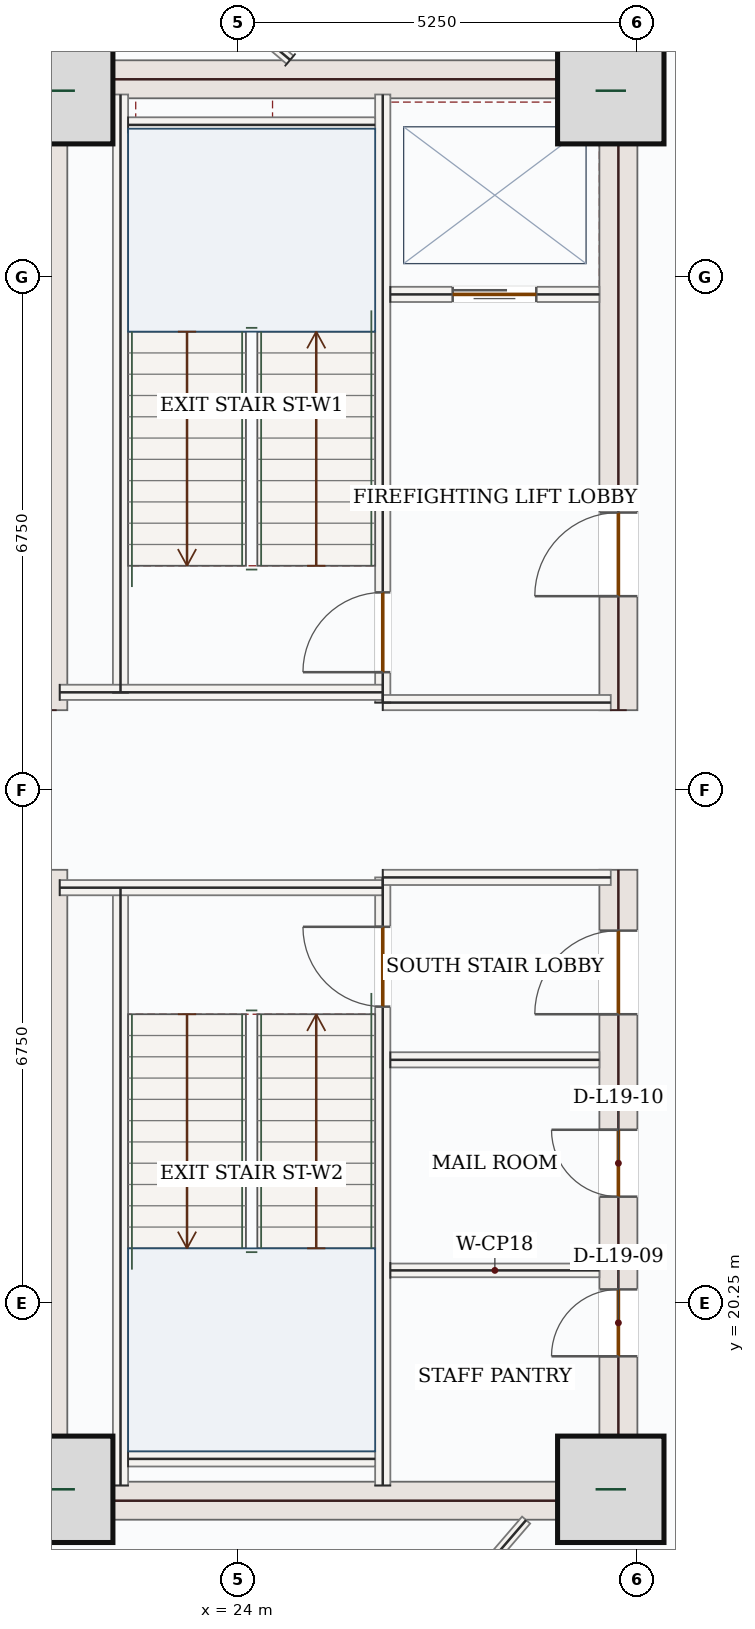
"""IFC4 building model, lengths in metres.
Left out: names, types, materials, properties, quantities, classifications, styles, units other than length and angle.
Written with IfcOpenShell. Run it as: python <this file> out.ifc"""

import sys

from ifc_helpers import new_model, si_unit, direction, frame, frame_2d, origin, origin_2d, place, context, subcontext, project, spatial, rectangle, extrude, source, transform, mapped, element, fill, save


model = new_model("IFC4")
c1 = context("Model", 3, precision=1e-05, world=origin(), true_north=direction((0.0, 1.0)))
c2 = subcontext(c1, "Body", "Model", "MODEL_VIEW")
j1 = project(units=[si_unit("LENGTHUNIT", "METRE"), si_unit("PLANEANGLEUNIT", "RADIAN")], contexts=[c1])
p1 = place(None, origin())
s1 = spatial("IfcSite", under=j1, at=p1, CompositionType="ELEMENT")
p2 = place(p1, origin())
s2 = spatial("IfcBuilding", under=s1, at=p2, CompositionType="ELEMENT")
p3 = place(p2, frame((0.0, 0.0, 87.9)))
s3 = spatial("IfcBuildingStorey", under=s2, at=p3, CompositionType="ELEMENT", Elevation=87.9)
m1 = source(origin(), c2, "Body", "SweptSolid", [
    extrude(rectangle(XDim=8.55, YDim=0.5, at=frame_2d((4.275, 0.0))), origin(), (0.0, 0.0, 1.0), 3.95),
])
for number, where, z_axis, x_axis in (
    (1, (21.5, 17.4, 0.0), (0.0, 0.0, 1.0), (0.0, 1.0, 0.0)),
    (2, (21.5, 28.05, 0.0), (0.0, 0.0, 1.0), (0.0, 1.0, 0.0)),
):
    element("IfcWall", number, at=place(p3, frame(where, z_axis=z_axis, x_axis=x_axis)), inside=s3, PredefinedType="SHEAR", context=c2, shape_type="MappedRepresentation", body=[
        mapped(m1, transform((0.0, 0.0, 0.0), x_axis=(1.0, 0.0, 0.0), y_axis=(0.0, 1.0, 0.0), z_axis=(0.0, 0.0, 1.0), scale=1.0)),
    ])
p4 = place(p3, frame((29.0, 17.4, 0.0), z_axis=(0.0, 0.0, 1.0), x_axis=(0.0, 1.0, 0.0)))
e3 = element("IfcWall", 3, at=p4, inside=s3, PredefinedType="SHEAR", context=c2, shape_type="SweptSolid", body=[
    extrude(rectangle(XDim=8.55, YDim=0.5, at=frame_2d((4.275, 0.0))), origin(), (0.0, 0.0, 1.0), 3.95),
])
p5 = place(p4, frame((6.65, 0.0, 0.0)))
e4 = element("IfcOpeningElement", 4, at=p5, cuts=e3, PredefinedType="OPENING", context=c2, shape_type="SweptSolid", body=[
    extrude(rectangle(XDim=1.1, YDim=2.2, at=frame_2d((0.55, 1.1))), frame((0.0, 0.26, 0.0), z_axis=(0.0, -1.0, 0.0), x_axis=(1.0, 0.0, 0.0)), (0.0, 0.0, 1.0), 0.52),
])
p6 = place(p4, frame((2.15, 0.0, 0.0)))
e5 = element("IfcOpeningElement", 5, at=p6, cuts=e3, PredefinedType="OPENING", context=c2, shape_type="SweptSolid", body=[
    extrude(rectangle(XDim=0.88, YDim=2.1, at=frame_2d((0.44, 1.05))), frame((0.0, 0.26, 0.0), z_axis=(0.0, -1.0, 0.0), x_axis=(1.0, 0.0, 0.0)), (0.0, 0.0, 1.0), 0.52),
])
p7 = place(p4, frame((4.25, 0.0, 0.0)))
e6 = element("IfcOpeningElement", 6, at=p7, cuts=e3, PredefinedType="OPENING", context=c2, shape_type="SweptSolid", body=[
    extrude(rectangle(XDim=0.88, YDim=2.1, at=frame_2d((0.44, 1.05))), frame((0.0, 0.26, 0.0), z_axis=(0.0, -1.0, 0.0), x_axis=(1.0, 0.0, 0.0)), (0.0, 0.0, 1.0), 0.52),
])
p8 = place(p3, frame((29.0, 28.05, 0.0), z_axis=(0.0, 0.0, 1.0), x_axis=(0.0, 1.0, 0.0)))
e7 = element("IfcWall", 7, at=p8, inside=s3, PredefinedType="SHEAR", context=c2, shape_type="SweptSolid", body=[
    extrude(rectangle(XDim=8.55, YDim=0.5, at=frame_2d((4.275, 0.0))), origin(), (0.0, 0.0, 1.0), 3.95),
])
p9 = place(p8, frame((1.5, 0.0, 0.0)))
e8 = element("IfcOpeningElement", 8, at=p9, cuts=e7, PredefinedType="OPENING", context=c2, shape_type="SweptSolid", body=[
    extrude(rectangle(XDim=1.1, YDim=2.2, at=frame_2d((0.55, 1.1))), frame((0.0, 0.26, 0.0), z_axis=(0.0, -1.0, 0.0), x_axis=(1.0, 0.0, 0.0)), (0.0, 0.0, 1.0), 0.52),
])
m2 = source(origin(), c2, "Body", "SweptSolid", [
    extrude(rectangle(XDim=7.0, YDim=0.5, at=frame_2d((3.5, 0.0))), origin(), (0.0, 0.0, 1.0), 3.95),
])
for number, where, z_axis, x_axis in (
    (9, (21.75, 17.65, 0.0), (0.0, 0.0, 1.0), (1.0, 0.0, 0.0)),
    (10, (21.75, 36.35, 0.0), (0.0, 0.0, 1.0), (1.0, 0.0, 0.0)),
):
    element("IfcWall", number, at=place(p3, frame(where, z_axis=z_axis, x_axis=x_axis)), inside=s3, PredefinedType="SHEAR", context=c2, shape_type="MappedRepresentation", body=[
        mapped(m2, transform((0.0, 0.0, 0.0), x_axis=(1.0, 0.0, 0.0), y_axis=(0.0, 1.0, 0.0), z_axis=(0.0, 0.0, 1.0), scale=1.0)),
    ])
m3 = source(origin(), c2, "Body", "SweptSolid", [
    extrude(rectangle(XDim=1.4, YDim=1.4, at=origin_2d()), origin(), (0.0, 0.0, 1.0), 4.2),
])
for number, where, z_axis, x_axis in (
    (11, (21.65, 17.8, 0.0), (0.0, 0.0, 1.0), (1.0, 0.0, 0.0)),
    (12, (28.9, 17.8, 0.0), (0.0, 0.0, 1.0), (1.0, 0.0, 0.0)),
    (13, (21.65, 36.2, 0.0), (0.0, 0.0, 1.0), (1.0, 0.0, 0.0)),
    (14, (28.9, 36.2, 0.0), (0.0, 0.0, 1.0), (1.0, 0.0, 0.0)),
):
    element("IfcColumn", number, at=place(p3, frame(where, z_axis=z_axis, x_axis=x_axis)), inside=s3, PredefinedType="COLUMN", context=c2, shape_type="MappedRepresentation", body=[
        mapped(m3, transform((0.0, 0.0, 0.0), x_axis=(1.0, 0.0, 0.0), y_axis=(0.0, 1.0, 0.0), z_axis=(0.0, 0.0, 1.0), scale=1.0)),
    ])
p10 = place(p3, frame((22.658, 14.74, 0.0), z_axis=(0.0, 0.0, 1.0), x_axis=(-0.707106781187, 0.707106781187, 0.0)))
e15 = element("IfcWall", 15, at=p10, inside=s3, PredefinedType="SOLIDWALL", context=c2, shape_type="SweptSolid", body=[
    extrude(rectangle(XDim=5.258, YDim=0.32, at=frame_2d((2.629, 0.0))), origin(), (0.0, 0.0, 1.0), 3.95),
])
p11 = place(p10, frame((1.429, 0.0, 0.85)))
e16 = element("IfcOpeningElement", 16, at=p11, cuts=e15, PredefinedType="OPENING", context=c2, shape_type="SweptSolid", body=[
    extrude(rectangle(XDim=2.4, YDim=1.8, at=frame_2d((1.2, 0.9))), frame((0.0, 0.17, 0.0), z_axis=(0.0, -1.0, 0.0), x_axis=(1.0, 0.0, 0.0)), (0.0, 0.0, 1.0), 0.34),
])
m4 = source(origin(), c2, "Body", "SweptSolid", [
    extrude(rectangle(XDim=5.258, YDim=0.32, at=frame_2d((2.629, 0.0))), origin(), (0.0, 0.0, 1.0), 3.95),
])
p12 = place(p3, frame((18.94, 35.542, 0.0), z_axis=(0.0, 0.0, 1.0), x_axis=(0.707106781187, 0.707106781187, 0.0)))
e17 = element("IfcWall", 17, at=p12, inside=s3, PredefinedType="SOLIDWALL", context=c2, shape_type="MappedRepresentation", body=[
    mapped(m4, transform((0.0, 0.0, 0.0), x_axis=(1.0, 0.0, 0.0), y_axis=(0.0, 1.0, 0.0), z_axis=(0.0, 0.0, 1.0), scale=1.0)),
])
m5 = source(origin(), c2, "Body", "SweptSolid", [
    extrude(rectangle(XDim=7.87, YDim=0.2, at=frame_2d((3.935, 0.0))), origin(), (0.0, 0.0, 1.0), 3.95),
])
for number, where, z_axis, x_axis in (
    (18, (22.45, 17.85, 0.0), (0.0, 0.0, 1.0), (0.0, 1.0, 0.0)),
    (19, (22.45, 28.28, 0.0), (0.0, 0.0, 1.0), (0.0, 1.0, 0.0)),
):
    element("IfcWall", number, at=place(p3, frame(where, z_axis=z_axis, x_axis=x_axis)), inside=s3, PredefinedType="SOLIDWALL", context=c2, shape_type="MappedRepresentation", body=[
        mapped(m5, transform((0.0, 0.0, 0.0), x_axis=(1.0, 0.0, 0.0), y_axis=(0.0, 1.0, 0.0), z_axis=(0.0, 0.0, 1.0), scale=1.0)),
    ])
p13 = place(p3, frame((25.9, 17.85, 0.0), z_axis=(0.0, 0.0, 1.0), x_axis=(0.0, 1.0, 0.0)))
e20 = element("IfcWall", 20, at=p13, inside=s3, PredefinedType="SOLIDWALL", context=c2, shape_type="SweptSolid", body=[
    extrude(rectangle(XDim=8.0, YDim=0.2, at=frame_2d((4.0, 0.0))), origin(), (0.0, 0.0, 1.0), 3.95),
])
p14 = place(p13, frame((6.3, 0.0, 0.0)))
e21 = element("IfcOpeningElement", 21, at=p14, cuts=e20, PredefinedType="OPENING", context=c2, shape_type="SweptSolid", body=[
    extrude(rectangle(XDim=1.05, YDim=2.15, at=frame_2d((0.525, 1.075))), frame((0.0, 0.11, 0.0), z_axis=(0.0, -1.0, 0.0), x_axis=(1.0, 0.0, 0.0)), (0.0, 0.0, 1.0), 0.22),
])
p15 = place(p3, frame((25.9, 28.15, 0.0), z_axis=(0.0, 0.0, 1.0), x_axis=(0.0, 1.0, 0.0)))
e22 = element("IfcWall", 22, at=p15, inside=s3, PredefinedType="SOLIDWALL", context=c2, shape_type="SweptSolid", body=[
    extrude(rectangle(XDim=8.0, YDim=0.2, at=frame_2d((4.0, 0.0))), origin(), (0.0, 0.0, 1.0), 3.95),
])
p16 = place(p15, frame((0.4, 0.0, 0.0)))
e23 = element("IfcOpeningElement", 23, at=p16, cuts=e22, PredefinedType="OPENING", context=c2, shape_type="SweptSolid", body=[
    extrude(rectangle(XDim=1.05, YDim=2.15, at=frame_2d((0.525, 1.075))), frame((0.0, 0.11, 0.0), z_axis=(0.0, -1.0, 0.0), x_axis=(1.0, 0.0, 0.0)), (0.0, 0.0, 1.0), 0.22),
])
m6 = source(origin(), c2, "Body", "SweptSolid", [
    extrude(rectangle(XDim=4.25, YDim=0.2, at=frame_2d((2.125, 0.0))), origin(), (0.0, 0.0, 1.0), 3.95),
])
p17 = place(p3, frame((21.65, 25.715, 0.0), z_axis=(0.0, 0.0, 1.0), x_axis=(1.0, 0.0, 0.0)))
e24 = element("IfcWall", 24, at=p17, inside=s3, PredefinedType="SOLIDWALL", context=c2, shape_type="MappedRepresentation", body=[
    mapped(m6, transform((0.0, 0.0, 0.0), x_axis=(1.0, 0.0, 0.0), y_axis=(0.0, 1.0, 0.0), z_axis=(0.0, 0.0, 1.0), scale=1.0)),
])
m7 = source(origin(), c2, "Body", "SweptSolid", [
    extrude(rectangle(XDim=3.0, YDim=0.2, at=frame_2d((1.5, 0.0))), origin(), (0.0, 0.0, 1.0), 3.95),
])
p18 = place(p3, frame((25.9, 25.85, 0.0), z_axis=(0.0, 0.0, 1.0), x_axis=(1.0, 0.0, 0.0)))
e25 = element("IfcWall", 25, at=p18, inside=s3, PredefinedType="SOLIDWALL", context=c2, shape_type="MappedRepresentation", body=[
    mapped(m7, transform((0.0, 0.0, 0.0), x_axis=(1.0, 0.0, 0.0), y_axis=(0.0, 1.0, 0.0), z_axis=(0.0, 0.0, 1.0), scale=1.0)),
])
p19 = place(p3, frame((21.65, 28.285, 0.0), z_axis=(0.0, 0.0, 1.0), x_axis=(1.0, 0.0, 0.0)))
e26 = element("IfcWall", 26, at=p19, inside=s3, PredefinedType="SOLIDWALL", context=c2, shape_type="MappedRepresentation", body=[
    mapped(m6, transform((0.0, 0.0, 0.0), x_axis=(1.0, 0.0, 0.0), y_axis=(0.0, 1.0, 0.0), z_axis=(0.0, 0.0, 1.0), scale=1.0)),
])
p20 = place(p3, frame((25.9, 28.15, 0.0), z_axis=(0.0, 0.0, 1.0), x_axis=(1.0, 0.0, 0.0)))
e27 = element("IfcWall", 27, at=p20, inside=s3, PredefinedType="SOLIDWALL", context=c2, shape_type="MappedRepresentation", body=[
    mapped(m7, transform((0.0, 0.0, 0.0), x_axis=(1.0, 0.0, 0.0), y_axis=(0.0, 1.0, 0.0), z_axis=(0.0, 0.0, 1.0), scale=1.0)),
])
m8 = source(origin(), c2, "Body", "SweptSolid", [
    extrude(rectangle(XDim=3.25, YDim=0.2, at=frame_2d((1.625, 0.0))), origin(), (0.0, 0.0, 1.0), 3.95),
])
for number, where, z_axis, x_axis in (
    (28, (22.55, 35.75, 0.0), (0.0, 0.0, 1.0), (1.0, 0.0, 0.0)),
    (29, (22.55, 18.2, 0.0), (0.0, 0.0, 1.0), (1.0, 0.0, 0.0)),
):
    element("IfcWall", number, at=place(p3, frame(where, z_axis=z_axis, x_axis=x_axis)), inside=s3, PredefinedType="SOLIDWALL", context=c2, shape_type="MappedRepresentation", body=[
        mapped(m8, transform((0.0, 0.0, 0.0), x_axis=(1.0, 0.0, 0.0), y_axis=(0.0, 1.0, 0.0), z_axis=(0.0, 0.0, 1.0), scale=1.0)),
    ])
p21 = place(p3, frame((26.0, 33.52, 0.0), z_axis=(0.0, 0.0, 1.0), x_axis=(1.0, 0.0, 0.0)))
e30 = element("IfcWall", 30, at=p21, inside=s3, PredefinedType="SOLIDWALL", context=c2, shape_type="SweptSolid", body=[
    extrude(rectangle(XDim=2.75, YDim=0.2, at=frame_2d((1.375, 0.0))), origin(), (0.0, 0.0, 1.0), 3.95),
])
p22 = place(p21, frame((0.82, 0.0, 0.0)))
e31 = element("IfcOpeningElement", 31, at=p22, cuts=e30, PredefinedType="OPENING", context=c2, shape_type="SweptSolid", body=[
    extrude(rectangle(XDim=1.1, YDim=2.15, at=frame_2d((0.55, 1.075))), frame((0.0, 0.11, 0.0), z_axis=(0.0, -1.0, 0.0), x_axis=(1.0, 0.0, 0.0)), (0.0, 0.0, 1.0), 0.22),
])
m9 = source(origin(), c2, "Body", "SweptSolid", [
    extrude(rectangle(XDim=2.75, YDim=0.2, at=frame_2d((1.375, 0.0))), origin(), (0.0, 0.0, 1.0), 3.95),
])
p23 = place(p3, frame((26.0, 23.45, 0.0), z_axis=(0.0, 0.0, 1.0), x_axis=(1.0, 0.0, 0.0)))
e32 = element("IfcWall", 32, at=p23, inside=s3, PredefinedType="SOLIDWALL", context=c2, shape_type="MappedRepresentation", body=[
    mapped(m9, transform((0.0, 0.0, 0.0), x_axis=(1.0, 0.0, 0.0), y_axis=(0.0, 1.0, 0.0), z_axis=(0.0, 0.0, 1.0), scale=1.0)),
])
m10 = source(origin(), c2, "Body", "SweptSolid", [
    extrude(rectangle(XDim=2.75, YDim=0.18, at=frame_2d((1.375, 0.0))), origin(), (0.0, 0.0, 1.0), 3.95),
])
p24 = place(p3, frame((26.0, 20.68, 0.0), z_axis=(0.0, 0.0, 1.0), x_axis=(1.0, 0.0, 0.0)))
e33 = element("IfcWall", 33, at=p24, inside=s3, PredefinedType="PARTITIONING", context=c2, shape_type="MappedRepresentation", body=[
    mapped(m10, transform((0.0, 0.0, 0.0), x_axis=(1.0, 0.0, 0.0), y_axis=(0.0, 1.0, 0.0), z_axis=(0.0, 0.0, 1.0), scale=1.0)),
])
m11 = source(origin(), c2, "Body", "SweptSolid", [
    extrude(rectangle(XDim=3.155, YDim=0.14, at=frame_2d((1.577, 0.0))), origin(), (0.0, 0.0, 1.0), 3.95),
])
p25 = place(p3, frame((24.682, 36.605, 0.0), z_axis=(0.0, 0.0, 1.0), x_axis=(-0.76411384058, 0.645081420159, 0.0)))
e34 = element("IfcWall", 34, at=p25, inside=s3, PredefinedType="PARTITIONING", context=c2, shape_type="MappedRepresentation", body=[
    mapped(m11, transform((0.0, 0.0, 0.0), x_axis=(1.0, 0.0, 0.0), y_axis=(0.0, 1.0, 0.0), z_axis=(0.0, 0.0, 1.0), scale=1.0)),
])
m12 = source(origin(), c2, "Body", "SweptSolid", [
    extrude(rectangle(XDim=3.29, YDim=0.14, at=frame_2d((1.645, 0.0))), origin(), (0.0, 0.0, 1.0), 3.95),
])
p26 = place(p3, frame((25.64, 14.901, 0.0), z_axis=(0.0, 0.0, 1.0), x_axis=(0.652214149627, 0.758034763732, 0.0)))
e35 = element("IfcWall", 35, at=p26, inside=s3, PredefinedType="PARTITIONING", context=c2, shape_type="MappedRepresentation", body=[
    mapped(m12, transform((0.0, 0.0, 0.0), x_axis=(1.0, 0.0, 0.0), y_axis=(0.0, 1.0, 0.0), z_axis=(0.0, 0.0, 1.0), scale=1.0)),
])
m13 = source(origin(), c2, "Body", "SweptSolid", [
    extrude(rectangle(XDim=2.4, YDim=1.8, at=frame_2d((1.2, 0.9))), frame((0.0, 0.03, 0.0), z_axis=(0.0, -1.0, 0.0), x_axis=(1.0, 0.0, 0.0)), (0.0, 0.0, 1.0), 0.06),
])
p27 = place(p11, origin())
e36 = element("IfcWindow", 36, at=p27, inside=s3, PartitioningType="DOUBLE_PANEL_VERTICAL", PredefinedType="WINDOW", context=c2, shape_type="MappedRepresentation", body=[
    mapped(m13, transform((0.0, 0.0, 0.0), x_axis=(1.0, 0.0, 0.0), y_axis=(0.0, 1.0, 0.0), z_axis=(0.0, 0.0, 1.0), scale=1.0)),
])
fill(e16, e36)
m14 = source(origin(), c2, "Body", "SweptSolid", [
    extrude(rectangle(XDim=1.05, YDim=2.15, at=frame_2d((0.525, 1.075))), frame((0.0, 0.025, 0.0), z_axis=(0.0, -1.0, 0.0), x_axis=(1.0, 0.0, 0.0)), (0.0, 0.0, 1.0), 0.05),
])
p28 = place(p16, origin())
e37 = element("IfcDoor", 37, at=p28, inside=s3, OperationType="SINGLE_SWING_LEFT", PredefinedType="DOOR", context=c2, shape_type="MappedRepresentation", body=[
    mapped(m14, transform((0.0, 0.0, 0.0), x_axis=(1.0, 0.0, 0.0), y_axis=(0.0, 1.0, 0.0), z_axis=(0.0, 0.0, 1.0), scale=1.0)),
])
fill(e23, e37)
p29 = place(p14, origin())
e38 = element("IfcDoor", 38, at=p29, inside=s3, OperationType="SINGLE_SWING_RIGHT", PredefinedType="DOOR", context=c2, shape_type="MappedRepresentation", body=[
    mapped(m14, transform((0.0, 0.0, 0.0), x_axis=(1.0, 0.0, 0.0), y_axis=(0.0, 1.0, 0.0), z_axis=(0.0, 0.0, 1.0), scale=1.0)),
])
fill(e21, e38)
m15 = source(origin(), c2, "Body", "SweptSolid", [
    extrude(rectangle(XDim=1.1, YDim=2.15, at=frame_2d((0.55, 1.075))), frame((0.0, 0.025, 0.0), z_axis=(0.0, -1.0, 0.0), x_axis=(1.0, 0.0, 0.0)), (0.0, 0.0, 1.0), 0.05),
])
p30 = place(p22, origin())
e39 = element("IfcDoor", 39, at=p30, inside=s3, OperationType="DOUBLE_DOOR_SLIDING", PredefinedType="DOOR", context=c2, shape_type="MappedRepresentation", body=[
    mapped(m15, transform((0.0, 0.0, 0.0), x_axis=(1.0, 0.0, 0.0), y_axis=(0.0, 1.0, 0.0), z_axis=(0.0, 0.0, 1.0), scale=1.0)),
])
fill(e31, e39)
m16 = source(origin(), c2, "Body", "SweptSolid", [
    extrude(rectangle(XDim=1.1, YDim=2.2, at=frame_2d((0.55, 1.1))), frame((0.0, 0.025, 0.0), z_axis=(0.0, -1.0, 0.0), x_axis=(1.0, 0.0, 0.0)), (0.0, 0.0, 1.0), 0.05),
])
p31 = place(p9, origin())
e40 = element("IfcDoor", 40, at=p31, inside=s3, OperationType="SINGLE_SWING_LEFT", PredefinedType="DOOR", context=c2, shape_type="MappedRepresentation", body=[
    mapped(m16, transform((0.0, 0.0, 0.0), x_axis=(1.0, 0.0, 0.0), y_axis=(0.0, 1.0, 0.0), z_axis=(0.0, 0.0, 1.0), scale=1.0)),
])
fill(e8, e40)
p32 = place(p5, origin())
e41 = element("IfcDoor", 41, at=p32, inside=s3, OperationType="SINGLE_SWING_LEFT", PredefinedType="DOOR", context=c2, shape_type="MappedRepresentation", body=[
    mapped(m16, transform((0.0, 0.0, 0.0), x_axis=(1.0, 0.0, 0.0), y_axis=(0.0, 1.0, 0.0), z_axis=(0.0, 0.0, 1.0), scale=1.0)),
])
fill(e4, e41)
m17 = source(origin(), c2, "Body", "SweptSolid", [
    extrude(rectangle(XDim=0.88, YDim=2.1, at=frame_2d((0.44, 1.05))), frame((0.0, 0.025, 0.0), z_axis=(0.0, -1.0, 0.0), x_axis=(1.0, 0.0, 0.0)), (0.0, 0.0, 1.0), 0.05),
])
p33 = place(p6, origin())
e42 = element("IfcDoor", 42, at=p33, inside=s3, OperationType="SINGLE_SWING_LEFT", PredefinedType="DOOR", context=c2, shape_type="MappedRepresentation", body=[
    mapped(m17, transform((0.0, 0.0, 0.0), x_axis=(1.0, 0.0, 0.0), y_axis=(0.0, 1.0, 0.0), z_axis=(0.0, 0.0, 1.0), scale=1.0)),
])
fill(e5, e42)
p34 = place(p7, origin())
e43 = element("IfcDoor", 43, at=p34, inside=s3, OperationType="SINGLE_SWING_RIGHT", PredefinedType="DOOR", context=c2, shape_type="MappedRepresentation", body=[
    mapped(m17, transform((0.0, 0.0, 0.0), x_axis=(1.0, 0.0, 0.0), y_axis=(0.0, 1.0, 0.0), z_axis=(0.0, 0.0, 1.0), scale=1.0)),
])
fill(e6, e43)
save(model, sys.argv[1])
